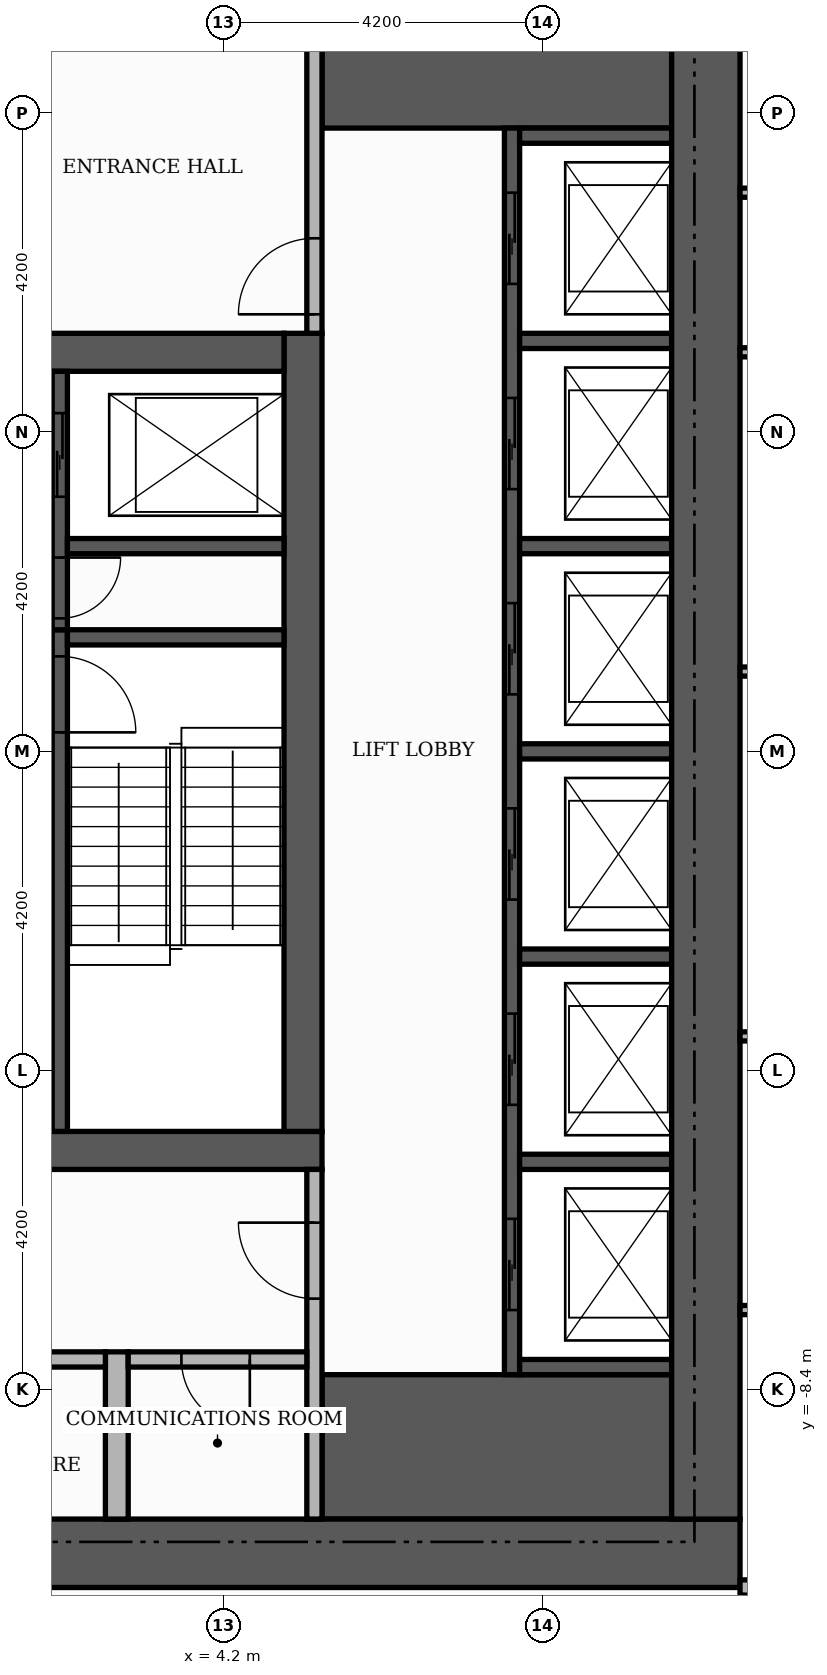
"""IFC4 building model, lengths in metres.
Left out: names, types, materials, properties, quantities, classifications, styles, units other than length and angle.
Written with IfcOpenShell. Run it as: python <this file> out.ifc"""

import sys

from ifc_helpers import new_model, si_unit, direction, frame, frame_2d, origin, place, context, subcontext, project, spatial, rectangle, extrude, element, fill, save


model = new_model("IFC4")
c1 = context("Model", 3, precision=1e-05, world=origin(), true_north=direction((0.0, 1.0)))
c2 = subcontext(c1, "Body", "Model", "MODEL_VIEW")
j1 = project(units=[si_unit("LENGTHUNIT", "METRE"), si_unit("PLANEANGLEUNIT", "RADIAN")], contexts=[c1])
p1 = place(None, origin())
s1 = spatial("IfcSite", under=j1, at=p1, CompositionType="ELEMENT")
p2 = place(p1, origin())
s2 = spatial("IfcBuilding", under=s1, at=p2, CompositionType="ELEMENT")
p3 = place(p2, frame((0.0, 0.0, 275.7)))
s3 = spatial("IfcBuildingStorey", under=s2, at=p3, CompositionType="ELEMENT", Elevation=275.7)
p4 = place(p3, frame((-5.5, -5.25, 0.0), z_axis=(0.0, 0.0, 1.0), x_axis=(1.0, 0.0, 0.0)))
e1 = element("IfcWall", 1, at=p4, inside=s3, PredefinedType="SHEAR", context=c2, shape_type="SweptSolid", body=[
    extrude(rectangle(XDim=11.0, YDim=0.5, at=frame_2d((5.5, 0.0))), origin(), (0.0, 0.0, 1.0), 3.48),
])
p5 = place(p4, frame((4.9, 0.0, 0.0)))
e2 = element("IfcOpeningElement", 2, at=p5, cuts=e1, PredefinedType="OPENING", context=c2, shape_type="SweptSolid", body=[
    extrude(rectangle(XDim=1.2, YDim=2.1, at=frame_2d((0.6, 1.05))), frame((0.0, 0.26, 0.0), z_axis=(0.0, -1.0, 0.0), x_axis=(1.0, 0.0, 0.0)), (0.0, 0.0, 1.0), 0.52),
])
p6 = place(p3, frame((5.25, -5.0, 0.0), z_axis=(0.0, 0.0, 1.0), x_axis=(0.0, 1.0, 0.0)))
e3 = element("IfcWall", 3, at=p6, inside=s3, PredefinedType="SHEAR", context=c2, shape_type="SweptSolid", body=[
    extrude(rectangle(XDim=10.5, YDim=0.5, at=frame_2d((5.25, 0.0))), origin(), (0.0, 0.0, 1.0), 3.48),
])
p7 = place(p3, frame((-5.0, 5.25, 0.0), z_axis=(0.0, 0.0, 1.0), x_axis=(1.0, 0.0, 0.0)))
e4 = element("IfcWall", 4, at=p7, inside=s3, PredefinedType="SHEAR", context=c2, shape_type="SweptSolid", body=[
    extrude(rectangle(XDim=10.0, YDim=0.5, at=frame_2d((5.0, 0.0))), origin(), (0.0, 0.0, 1.0), 3.48),
])
p8 = place(p7, frame((4.4, 0.0, 0.0)))
e5 = element("IfcOpeningElement", 5, at=p8, cuts=e4, PredefinedType="OPENING", context=c2, shape_type="SweptSolid", body=[
    extrude(rectangle(XDim=1.2, YDim=2.1, at=frame_2d((0.6, 1.05))), frame((0.0, 0.26, 0.0), z_axis=(0.0, -1.0, 0.0), x_axis=(1.0, 0.0, 0.0)), (0.0, 0.0, 1.0), 0.52),
])
for number, where, z_axis, x_axis in (
    (6, (5.5, -9.15, 0.0), (0.0, 0.0, 1.0), (1.0, 0.0, 0.0)),
    (7, (5.5, 9.15, 0.0), (0.0, 0.0, 1.0), (1.0, 0.0, 0.0)),
):
    element("IfcWall", number, at=place(p3, frame(where, z_axis=z_axis, x_axis=x_axis)), inside=s3, PredefinedType="SHEAR", context=c2, shape_type="SweptSolid", body=[
        extrude(rectangle(XDim=4.6, YDim=1.9, at=frame_2d((2.3, 0.0))), origin(), (0.0, 0.0, 1.0), 3.48),
    ])
p9 = place(p3, frame((2.05, -5.0, 0.0), z_axis=(0.0, 0.0, 1.0), x_axis=(0.0, 1.0, 0.0)))
e8 = element("IfcWall", 8, at=p9, inside=s3, PredefinedType="SHEAR", context=c2, shape_type="SweptSolid", body=[
    extrude(rectangle(XDim=6.6, YDim=0.2, at=frame_2d((3.3, 0.0))), origin(), (0.0, 0.0, 1.0), 3.48),
])
p10 = place(p9, frame((5.25, 0.0, 0.0)))
e9 = element("IfcOpeningElement", 9, at=p10, cuts=e8, PredefinedType="OPENING", context=c2, shape_type="SweptSolid", body=[
    extrude(rectangle(XDim=1.0, YDim=2.1, at=frame_2d((0.5, 1.05))), frame((0.0, 0.11, 0.0), z_axis=(0.0, -1.0, 0.0), x_axis=(1.0, 0.0, 0.0)), (0.0, 0.0, 1.0), 0.22),
])
p11 = place(p3, frame((2.15, 1.5, 0.0), z_axis=(0.0, 0.0, 1.0), x_axis=(1.0, 0.0, 0.0)))
e10 = element("IfcWall", 10, at=p11, inside=s3, PredefinedType="SHEAR", context=c2, shape_type="SweptSolid", body=[
    extrude(rectangle(XDim=2.85, YDim=0.2, at=frame_2d((1.425, 0.0))), origin(), (0.0, 0.0, 1.0), 3.48),
])
p12 = place(p3, frame((8.0, -8.2, 0.0), z_axis=(0.0, 0.0, 1.0), x_axis=(0.0, 1.0, 0.0)))
e11 = element("IfcWall", 11, at=p12, inside=s3, PredefinedType="SHEAR", context=c2, shape_type="SweptSolid", body=[
    extrude(rectangle(XDim=16.4, YDim=0.2, at=frame_2d((8.2, 0.0))), origin(), (0.0, 0.0, 1.0), 3.48),
])
p13 = place(p12, frame((0.85, 0.0, 0.0)))
e12 = element("IfcOpeningElement", 12, at=p13, cuts=e11, PredefinedType="OPENING", context=c2, shape_type="SweptSolid", body=[
    extrude(rectangle(XDim=1.2, YDim=2.1, at=frame_2d((0.6, 1.05))), frame((0.0, 0.11, 0.0), z_axis=(0.0, -1.0, 0.0), x_axis=(1.0, 0.0, 0.0)), (0.0, 0.0, 1.0), 0.22),
])
p14 = place(p12, frame((3.55, 0.0, 0.0)))
e13 = element("IfcOpeningElement", 13, at=p14, cuts=e11, PredefinedType="OPENING", context=c2, shape_type="SweptSolid", body=[
    extrude(rectangle(XDim=1.2, YDim=2.1, at=frame_2d((0.6, 1.05))), frame((0.0, 0.11, 0.0), z_axis=(0.0, -1.0, 0.0), x_axis=(1.0, 0.0, 0.0)), (0.0, 0.0, 1.0), 0.22),
])
p15 = place(p12, frame((6.25, 0.0, 0.0)))
e14 = element("IfcOpeningElement", 14, at=p15, cuts=e11, PredefinedType="OPENING", context=c2, shape_type="SweptSolid", body=[
    extrude(rectangle(XDim=1.2, YDim=2.1, at=frame_2d((0.6, 1.05))), frame((0.0, 0.11, 0.0), z_axis=(0.0, -1.0, 0.0), x_axis=(1.0, 0.0, 0.0)), (0.0, 0.0, 1.0), 0.22),
])
p16 = place(p12, frame((8.95, 0.0, 0.0)))
e15 = element("IfcOpeningElement", 15, at=p16, cuts=e11, PredefinedType="OPENING", context=c2, shape_type="SweptSolid", body=[
    extrude(rectangle(XDim=1.2, YDim=2.1, at=frame_2d((0.6, 1.05))), frame((0.0, 0.11, 0.0), z_axis=(0.0, -1.0, 0.0), x_axis=(1.0, 0.0, 0.0)), (0.0, 0.0, 1.0), 0.22),
])
p17 = place(p12, frame((11.65, 0.0, 0.0)))
e16 = element("IfcOpeningElement", 16, at=p17, cuts=e11, PredefinedType="OPENING", context=c2, shape_type="SweptSolid", body=[
    extrude(rectangle(XDim=1.2, YDim=2.1, at=frame_2d((0.6, 1.05))), frame((0.0, 0.11, 0.0), z_axis=(0.0, -1.0, 0.0), x_axis=(1.0, 0.0, 0.0)), (0.0, 0.0, 1.0), 0.22),
])
p18 = place(p12, frame((14.35, 0.0, 0.0)))
e17 = element("IfcOpeningElement", 17, at=p18, cuts=e11, PredefinedType="OPENING", context=c2, shape_type="SweptSolid", body=[
    extrude(rectangle(XDim=1.2, YDim=2.1, at=frame_2d((0.6, 1.05))), frame((0.0, 0.11, 0.0), z_axis=(0.0, -1.0, 0.0), x_axis=(1.0, 0.0, 0.0)), (0.0, 0.0, 1.0), 0.22),
])
for number, where, z_axis, x_axis in (
    (18, (8.1, -8.1, 0.0), (0.0, 0.0, 1.0), (1.0, 0.0, 0.0)),
    (19, (8.1, -5.4, 0.0), (0.0, 0.0, 1.0), (1.0, 0.0, 0.0)),
    (20, (8.1, -2.7, 0.0), (0.0, 0.0, 1.0), (1.0, 0.0, 0.0)),
    (21, (8.1, 0.0, 0.0), (0.0, 0.0, 1.0), (1.0, 0.0, 0.0)),
):
    element("IfcWall", number, at=place(p3, frame(where, z_axis=z_axis, x_axis=x_axis)), inside=s3, PredefinedType="SHEAR", context=c2, shape_type="SweptSolid", body=[
        extrude(rectangle(XDim=2.0, YDim=0.2, at=frame_2d((1.0, 0.0))), origin(), (0.0, 0.0, 1.0), 3.48),
    ])
p19 = place(p3, frame((2.05, 1.6, 0.0), z_axis=(0.0, 0.0, 1.0), x_axis=(0.0, 1.0, 0.0)))
e22 = element("IfcWall", 22, at=p19, inside=s3, PredefinedType="SHEAR", context=c2, shape_type="SweptSolid", body=[
    extrude(rectangle(XDim=3.4, YDim=0.2, at=frame_2d((1.7, 0.0))), origin(), (0.0, 0.0, 1.0), 3.48),
])
p20 = place(p19, frame((1.75, 0.0, 0.0)))
e23 = element("IfcOpeningElement", 23, at=p20, cuts=e22, PredefinedType="OPENING", context=c2, shape_type="SweptSolid", body=[
    extrude(rectangle(XDim=1.1, YDim=2.1, at=frame_2d((0.55, 1.05))), frame((0.0, 0.11, 0.0), z_axis=(0.0, -1.0, 0.0), x_axis=(1.0, 0.0, 0.0)), (0.0, 0.0, 1.0), 0.22),
])
p21 = place(p19, frame((0.15, 0.0, 0.0)))
e24 = element("IfcOpeningElement", 24, at=p21, cuts=e22, PredefinedType="OPENING", context=c2, shape_type="SweptSolid", body=[
    extrude(rectangle(XDim=0.8, YDim=2.1, at=frame_2d((0.4, 1.05))), frame((0.0, 0.11, 0.0), z_axis=(0.0, -1.0, 0.0), x_axis=(1.0, 0.0, 0.0)), (0.0, 0.0, 1.0), 0.22),
])
p22 = place(p3, frame((2.15, 2.7, 0.0), z_axis=(0.0, 0.0, 1.0), x_axis=(1.0, 0.0, 0.0)))
e25 = element("IfcWall", 25, at=p22, inside=s3, PredefinedType="SHEAR", context=c2, shape_type="SweptSolid", body=[
    extrude(rectangle(XDim=2.85, YDim=0.2, at=frame_2d((1.425, 0.0))), origin(), (0.0, 0.0, 1.0), 3.48),
])
for number, where, z_axis, x_axis in (
    (26, (8.1, 2.7, 0.0), (0.0, 0.0, 1.0), (1.0, 0.0, 0.0)),
    (27, (8.1, 5.4, 0.0), (0.0, 0.0, 1.0), (1.0, 0.0, 0.0)),
    (28, (8.1, 8.1, 0.0), (0.0, 0.0, 1.0), (1.0, 0.0, 0.0)),
):
    element("IfcWall", number, at=place(p3, frame(where, z_axis=z_axis, x_axis=x_axis)), inside=s3, PredefinedType="SHEAR", context=c2, shape_type="SweptSolid", body=[
        extrude(rectangle(XDim=2.0, YDim=0.2, at=frame_2d((1.0, 0.0))), origin(), (0.0, 0.0, 1.0), 3.48),
    ])
p23 = place(p3, frame((-11.0, -10.55, 0.0), z_axis=(0.0, 0.0, 1.0), x_axis=(1.0, 0.0, 0.0)))
e29 = element("IfcWall", 29, at=p23, inside=s3, PredefinedType="SHEAR", context=c2, shape_type="SweptSolid", body=[
    extrude(rectangle(XDim=22.0, YDim=0.9, at=frame_2d((11.0, 0.0))), origin(), (0.0, 0.0, 1.0), 3.48),
])
p24 = place(p23, frame((7.4, 0.0, 0.0)))
e30 = element("IfcOpeningElement", 30, at=p24, cuts=e29, PredefinedType="OPENING", context=c2, shape_type="SweptSolid", body=[
    extrude(rectangle(XDim=1.8, YDim=2.2, at=frame_2d((0.9, 1.1))), frame((0.0, 0.46, 0.0), z_axis=(0.0, -1.0, 0.0), x_axis=(1.0, 0.0, 0.0)), (0.0, 0.0, 1.0), 0.92),
])
p25 = place(p3, frame((10.55, -10.1, 0.0), z_axis=(0.0, 0.0, 1.0), x_axis=(0.0, 1.0, 0.0)))
e31 = element("IfcWall", 31, at=p25, inside=s3, PredefinedType="SHEAR", context=c2, shape_type="SweptSolid", body=[
    extrude(rectangle(XDim=20.2, YDim=0.9, at=frame_2d((10.1, 0.0))), origin(), (0.0, 0.0, 1.0), 3.48),
])
p26 = place(p3, frame((2.8, -10.1, 0.0), z_axis=(0.0, 0.0, 1.0), x_axis=(0.0, 1.0, 0.0)))
e32 = element("IfcWall", 32, at=p26, inside=s3, PredefinedType="PARTITIONING", context=c2, shape_type="SweptSolid", body=[
    extrude(rectangle(XDim=2.2, YDim=0.3, at=frame_2d((1.1, 0.0))), origin(), (0.0, 0.0, 1.0), 3.48),
])
p27 = place(p3, frame((5.4, -10.1, 0.0), z_axis=(0.0, 0.0, 1.0), x_axis=(0.0, 1.0, 0.0)))
e33 = element("IfcWall", 33, at=p27, inside=s3, PredefinedType="PARTITIONING", context=c2, shape_type="SweptSolid", body=[
    extrude(rectangle(XDim=4.6, YDim=0.2, at=frame_2d((2.3, 0.0))), origin(), (0.0, 0.0, 1.0), 3.48),
])
p28 = place(p27, frame((2.9, 0.0, 0.0)))
e34 = element("IfcOpeningElement", 34, at=p28, cuts=e33, PredefinedType="OPENING", context=c2, shape_type="SweptSolid", body=[
    extrude(rectangle(XDim=1.0, YDim=2.1, at=frame_2d((0.5, 1.05))), frame((0.0, 0.11, 0.0), z_axis=(0.0, -1.0, 0.0), x_axis=(1.0, 0.0, 0.0)), (0.0, 0.0, 1.0), 0.22),
])
p29 = place(p3, frame((0.1, -8.0, 0.0), z_axis=(0.0, 0.0, 1.0), x_axis=(1.0, 0.0, 0.0)))
e35 = element("IfcWall", 35, at=p29, inside=s3, PredefinedType="PARTITIONING", context=c2, shape_type="SweptSolid", body=[
    extrude(rectangle(XDim=2.55, YDim=0.2, at=frame_2d((1.275, 0.0))), origin(), (0.0, 0.0, 1.0), 3.48),
])
p30 = place(p29, frame((0.85, 0.0, 0.0)))
e36 = element("IfcOpeningElement", 36, at=p30, cuts=e35, PredefinedType="OPENING", context=c2, shape_type="SweptSolid", body=[
    extrude(rectangle(XDim=0.9, YDim=2.1, at=frame_2d((0.45, 1.05))), frame((0.0, 0.11, 0.0), z_axis=(0.0, -1.0, 0.0), x_axis=(1.0, 0.0, 0.0)), (0.0, 0.0, 1.0), 0.22),
])
p31 = place(p3, frame((2.95, -8.0, 0.0), z_axis=(0.0, 0.0, 1.0), x_axis=(1.0, 0.0, 0.0)))
e37 = element("IfcWall", 37, at=p31, inside=s3, PredefinedType="PARTITIONING", context=c2, shape_type="SweptSolid", body=[
    extrude(rectangle(XDim=2.35, YDim=0.2, at=frame_2d((1.175, 0.0))), origin(), (0.0, 0.0, 1.0), 3.48),
])
p32 = place(p31, frame((0.7, 0.0, 0.0)))
e38 = element("IfcOpeningElement", 38, at=p32, cuts=e37, PredefinedType="OPENING", context=c2, shape_type="SweptSolid", body=[
    extrude(rectangle(XDim=0.9, YDim=2.1, at=frame_2d((0.45, 1.05))), frame((0.0, 0.11, 0.0), z_axis=(0.0, -1.0, 0.0), x_axis=(1.0, 0.0, 0.0)), (0.0, 0.0, 1.0), 0.22),
])
p33 = place(p3, frame((5.4, 5.5, 0.0), z_axis=(0.0, 0.0, 1.0), x_axis=(0.0, 1.0, 0.0)))
e39 = element("IfcWall", 39, at=p33, inside=s3, PredefinedType="PARTITIONING", context=c2, shape_type="SweptSolid", body=[
    extrude(rectangle(XDim=4.6, YDim=0.2, at=frame_2d((2.3, 0.0))), origin(), (0.0, 0.0, 1.0), 3.48),
])
p34 = place(p33, frame((0.25, 0.0, 0.0)))
e40 = element("IfcOpeningElement", 40, at=p34, cuts=e39, PredefinedType="OPENING", context=c2, shape_type="SweptSolid", body=[
    extrude(rectangle(XDim=1.0, YDim=2.1, at=frame_2d((0.5, 1.05))), frame((0.0, 0.11, 0.0), z_axis=(0.0, -1.0, 0.0), x_axis=(1.0, 0.0, 0.0)), (0.0, 0.0, 1.0), 0.22),
])
p35 = place(p3, frame((11.0, -11.0, 0.0), z_axis=(0.0, 0.0, 1.0), x_axis=(1.0, 0.0, 0.0)))
e41 = element("IfcWall", 41, at=p35, inside=s3, PredefinedType="PARTITIONING", context=c2, shape_type="SweptSolid", body=[
    extrude(rectangle(XDim=2.65, YDim=0.2, at=frame_2d((1.325, 0.0))), origin(), (0.0, 0.0, 1.0), 3.48),
])
p36 = place(p35, frame((0.775, 0.0, 0.0)))
e42 = element("IfcOpeningElement", 42, at=p36, cuts=e41, PredefinedType="OPENING", context=c2, shape_type="SweptSolid", body=[
    extrude(rectangle(XDim=1.1, YDim=2.4, at=frame_2d((0.55, 1.2))), frame((0.0, 0.11, 0.0), z_axis=(0.0, -1.0, 0.0), x_axis=(1.0, 0.0, 0.0)), (0.0, 0.0, 1.0), 0.22),
])
p37 = place(p3, frame((11.0, -7.35, 0.0), z_axis=(0.0, 0.0, 1.0), x_axis=(1.0, 0.0, 0.0)))
e43 = element("IfcWall", 43, at=p37, inside=s3, PredefinedType="PARTITIONING", context=c2, shape_type="SweptSolid", body=[
    extrude(rectangle(XDim=7.32, YDim=0.12, at=frame_2d((3.66, 0.0))), origin(), (0.0, 0.0, 1.0), 3.48),
])
p38 = place(p37, frame((3.21, 0.0, 0.0)))
e44 = element("IfcOpeningElement", 44, at=p38, cuts=e43, PredefinedType="OPENING", context=c2, shape_type="SweptSolid", body=[
    extrude(rectangle(XDim=0.9, YDim=2.1, at=frame_2d((0.45, 1.05))), frame((0.0, 0.07, 0.0), z_axis=(0.0, -1.0, 0.0), x_axis=(1.0, 0.0, 0.0)), (0.0, 0.0, 1.0), 0.14),
])
for number, where, z_axis, x_axis in (
    (45, (11.0, -3.75, 0.0), (0.0, 0.0, 1.0), (1.0, 0.0, 0.0)),
    (46, (11.0, 1.05, 0.0), (0.0, 0.0, 1.0), (1.0, 0.0, 0.0)),
    (47, (11.0, 5.25, 0.0), (0.0, 0.0, 1.0), (1.0, 0.0, 0.0)),
    (48, (11.0, 7.35, 0.0), (0.0, 0.0, 1.0), (1.0, 0.0, 0.0)),
):
    element("IfcWall", number, at=place(p3, frame(where, z_axis=z_axis, x_axis=x_axis)), inside=s3, PredefinedType="PARTITIONING", context=c2, shape_type="SweptSolid", body=[
        extrude(rectangle(XDim=7.32, YDim=0.12, at=frame_2d((3.66, 0.0))), origin(), (0.0, 0.0, 1.0), 3.48),
    ])
p39 = place(p13, origin())
e49 = element("IfcDoor", 49, at=p39, inside=s3, OperationType="SLIDING_TO_LEFT", PredefinedType="DOOR", context=c2, shape_type="SweptSolid", body=[
    extrude(rectangle(XDim=1.2, YDim=2.1, at=frame_2d((0.6, 1.05))), frame((0.0, 0.025, 0.0), z_axis=(0.0, -1.0, 0.0), x_axis=(1.0, 0.0, 0.0)), (0.0, 0.0, 1.0), 0.05),
])
fill(e12, e49)
p40 = place(p14, origin())
e50 = element("IfcDoor", 50, at=p40, inside=s3, OperationType="SLIDING_TO_LEFT", PredefinedType="DOOR", context=c2, shape_type="SweptSolid", body=[
    extrude(rectangle(XDim=1.2, YDim=2.1, at=frame_2d((0.6, 1.05))), frame((0.0, 0.025, 0.0), z_axis=(0.0, -1.0, 0.0), x_axis=(1.0, 0.0, 0.0)), (0.0, 0.0, 1.0), 0.05),
])
fill(e13, e50)
p41 = place(p15, origin())
e51 = element("IfcDoor", 51, at=p41, inside=s3, OperationType="SLIDING_TO_LEFT", PredefinedType="DOOR", context=c2, shape_type="SweptSolid", body=[
    extrude(rectangle(XDim=1.2, YDim=2.1, at=frame_2d((0.6, 1.05))), frame((0.0, 0.025, 0.0), z_axis=(0.0, -1.0, 0.0), x_axis=(1.0, 0.0, 0.0)), (0.0, 0.0, 1.0), 0.05),
])
fill(e14, e51)
p42 = place(p16, origin())
e52 = element("IfcDoor", 52, at=p42, inside=s3, OperationType="SLIDING_TO_LEFT", PredefinedType="DOOR", context=c2, shape_type="SweptSolid", body=[
    extrude(rectangle(XDim=1.2, YDim=2.1, at=frame_2d((0.6, 1.05))), frame((0.0, 0.025, 0.0), z_axis=(0.0, -1.0, 0.0), x_axis=(1.0, 0.0, 0.0)), (0.0, 0.0, 1.0), 0.05),
])
fill(e15, e52)
p43 = place(p17, origin())
e53 = element("IfcDoor", 53, at=p43, inside=s3, OperationType="SLIDING_TO_LEFT", PredefinedType="DOOR", context=c2, shape_type="SweptSolid", body=[
    extrude(rectangle(XDim=1.2, YDim=2.1, at=frame_2d((0.6, 1.05))), frame((0.0, 0.025, 0.0), z_axis=(0.0, -1.0, 0.0), x_axis=(1.0, 0.0, 0.0)), (0.0, 0.0, 1.0), 0.05),
])
fill(e16, e53)
p44 = place(p18, origin())
e54 = element("IfcDoor", 54, at=p44, inside=s3, OperationType="SLIDING_TO_LEFT", PredefinedType="DOOR", context=c2, shape_type="SweptSolid", body=[
    extrude(rectangle(XDim=1.2, YDim=2.1, at=frame_2d((0.6, 1.05))), frame((0.0, 0.025, 0.0), z_axis=(0.0, -1.0, 0.0), x_axis=(1.0, 0.0, 0.0)), (0.0, 0.0, 1.0), 0.05),
])
fill(e17, e54)
p45 = place(p20, origin())
e55 = element("IfcDoor", 55, at=p45, inside=s3, OperationType="SLIDING_TO_LEFT", PredefinedType="DOOR", context=c2, shape_type="SweptSolid", body=[
    extrude(rectangle(XDim=1.1, YDim=2.1, at=frame_2d((0.55, 1.05))), frame((0.0, 0.025, 0.0), z_axis=(0.0, -1.0, 0.0), x_axis=(1.0, 0.0, 0.0)), (0.0, 0.0, 1.0), 0.05),
])
fill(e23, e55)
p46 = place(p10, frame((1.0, 0.0, 0.0), z_axis=(0.0, 0.0, 1.0), x_axis=(-1.0, 0.0, 0.0)))
e56 = element("IfcDoor", 56, at=p46, inside=s3, OperationType="SINGLE_SWING_LEFT", PredefinedType="DOOR", context=c2, shape_type="SweptSolid", body=[
    extrude(rectangle(XDim=1.0, YDim=2.1, at=frame_2d((0.5, 1.05))), frame((0.0, 0.025, 0.0), z_axis=(0.0, -1.0, 0.0), x_axis=(1.0, 0.0, 0.0)), (0.0, 0.0, 1.0), 0.05),
])
fill(e9, e56)
p47 = place(p21, frame((0.8, 0.0, 0.0), z_axis=(0.0, 0.0, 1.0), x_axis=(-1.0, 0.0, 0.0)))
e57 = element("IfcDoor", 57, at=p47, inside=s3, OperationType="SINGLE_SWING_RIGHT", PredefinedType="DOOR", context=c2, shape_type="SweptSolid", body=[
    extrude(rectangle(XDim=0.8, YDim=2.1, at=frame_2d((0.4, 1.05))), frame((0.0, 0.025, 0.0), z_axis=(0.0, -1.0, 0.0), x_axis=(1.0, 0.0, 0.0)), (0.0, 0.0, 1.0), 0.05),
])
fill(e24, e57)
p48 = place(p34, origin())
e58 = element("IfcDoor", 58, at=p48, inside=s3, OperationType="SINGLE_SWING_LEFT", PredefinedType="DOOR", context=c2, shape_type="SweptSolid", body=[
    extrude(rectangle(XDim=1.0, YDim=2.1, at=frame_2d((0.5, 1.05))), frame((0.0, 0.025, 0.0), z_axis=(0.0, -1.0, 0.0), x_axis=(1.0, 0.0, 0.0)), (0.0, 0.0, 1.0), 0.05),
])
fill(e40, e58)
p49 = place(p28, origin())
e59 = element("IfcDoor", 59, at=p49, inside=s3, OperationType="SINGLE_SWING_RIGHT", PredefinedType="DOOR", context=c2, shape_type="SweptSolid", body=[
    extrude(rectangle(XDim=1.0, YDim=2.1, at=frame_2d((0.5, 1.05))), frame((0.0, 0.025, 0.0), z_axis=(0.0, -1.0, 0.0), x_axis=(1.0, 0.0, 0.0)), (0.0, 0.0, 1.0), 0.05),
])
fill(e34, e59)
p50 = place(p32, frame((0.9, 0.0, 0.0), z_axis=(0.0, 0.0, 1.0), x_axis=(-1.0, 0.0, 0.0)))
e60 = element("IfcDoor", 60, at=p50, inside=s3, OperationType="SINGLE_SWING_RIGHT", PredefinedType="DOOR", context=c2, shape_type="SweptSolid", body=[
    extrude(rectangle(XDim=0.9, YDim=2.1, at=frame_2d((0.45, 1.05))), frame((0.0, 0.025, 0.0), z_axis=(0.0, -1.0, 0.0), x_axis=(1.0, 0.0, 0.0)), (0.0, 0.0, 1.0), 0.05),
])
fill(e38, e60)
save(model, sys.argv[1])
